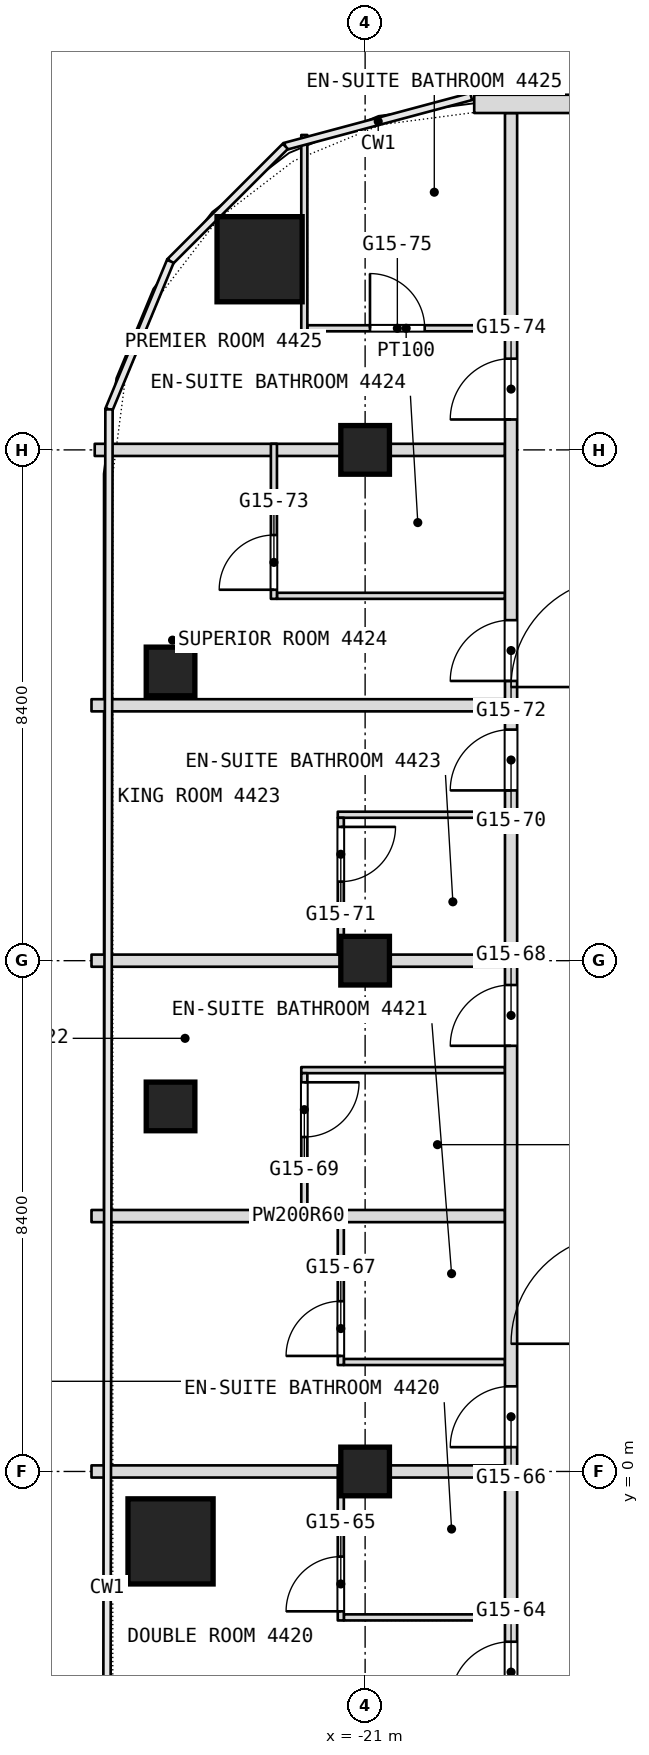
"""IFC4 building model, lengths in metres.
Left out: names, types, materials, properties, quantities, classifications, styles, units other than length and angle.
Written with IfcOpenShell. Run it as: python <this file> out.ifc"""

import sys

from ifc_helpers import new_model, si_unit, direction, frame, frame_2d, origin, origin_2d, place, context, subcontext, project, spatial, rectangle, extrude, element, fill, save


model = new_model("IFC4")
c1 = context("Model", 3, precision=1e-05, world=origin(), true_north=direction((0.0, 1.0)))
c2 = subcontext(c1, "Body", "Model", "MODEL_VIEW")
j1 = project(units=[si_unit("LENGTHUNIT", "METRE"), si_unit("PLANEANGLEUNIT", "RADIAN")], contexts=[c1])
p1 = place(None, origin())
s1 = spatial("IfcSite", under=j1, at=p1, CompositionType="ELEMENT")
p2 = place(p1, origin())
s2 = spatial("IfcBuilding", under=s1, at=p2, CompositionType="ELEMENT")
p3 = place(p2, frame((0.0, 0.0, 194.9)))
s3 = spatial("IfcBuildingStorey", under=s2, at=p3, CompositionType="ELEMENT", Elevation=194.9)
for number, where, z_axis, x_axis in (
    (1, (-22.736, 19.936, 0.0), (0.0, 0.0, 1.0), (1.0, 0.0, 0.0)),
    (2, (-24.2, -1.15, 0.0), (0.0, 0.0, 1.0), (1.0, 0.0, 0.0)),
):
    element("IfcColumn", number, at=place(p3, frame(where, z_axis=z_axis, x_axis=x_axis)), inside=s3, PredefinedType="COLUMN", context=c2, shape_type="SweptSolid", body=[
        extrude(rectangle(XDim=1.4, YDim=1.4, at=origin_2d()), origin(), (0.0, 0.0, 1.0), 3.6),
    ])
for number, where, z_axis, x_axis in (
    (3, (-21.0, 0.0, 0.0), (0.0, 0.0, 1.0), (1.0, 0.0, 0.0)),
    (4, (-21.0, 8.4, 0.0), (0.0, 0.0, 1.0), (1.0, 0.0, 0.0)),
    (5, (-21.0, 16.8, 0.0), (0.0, 0.0, 1.0), (1.0, 0.0, 0.0)),
    (6, (-24.2, 6.003, 0.0), (0.0, 0.0, 1.0), (1.0, 0.0, 0.0)),
    (7, (-24.2, 13.156, 0.0), (0.0, 0.0, 1.0), (1.0, 0.0, 0.0)),
):
    element("IfcColumn", number, at=place(p3, frame(where, z_axis=z_axis, x_axis=x_axis)), inside=s3, PredefinedType="COLUMN", context=c2, shape_type="SweptSolid", body=[
        extrude(rectangle(XDim=0.8, YDim=0.8, at=origin_2d()), origin(), (0.0, 0.0, 1.0), 3.6),
    ])
p4 = place(p3, frame((-21.35, -2.4, 0.0), z_axis=(0.0, 0.0, 1.0), x_axis=(1.0, 0.0, 0.0)))
e8 = element("IfcWall", 8, at=p4, inside=s3, PredefinedType="PARTITIONING", context=c2, shape_type="SweptSolid", body=[
    extrude(rectangle(XDim=2.65, YDim=0.1, at=frame_2d((1.325, 0.0))), origin(), (0.0, 0.0, 1.0), 3.34),
])
p5 = place(p3, frame((-25.5, 0.0, 0.0), z_axis=(0.0, 0.0, 1.0), x_axis=(1.0, 0.0, 0.0)))
e9 = element("IfcWall", 9, at=p5, inside=s3, PredefinedType="PARTITIONING", context=c2, shape_type="SweptSolid", body=[
    extrude(rectangle(XDim=6.8, YDim=0.2, at=frame_2d((3.4, 0.0))), origin(), (0.0, 0.0, 1.0), 2.94),
])
p6 = place(p3, frame((-21.35, 1.8, 0.0), z_axis=(0.0, 0.0, 1.0), x_axis=(1.0, 0.0, 0.0)))
e10 = element("IfcWall", 10, at=p6, inside=s3, PredefinedType="PARTITIONING", context=c2, shape_type="SweptSolid", body=[
    extrude(rectangle(XDim=2.65, YDim=0.1, at=frame_2d((1.325, 0.0))), origin(), (0.0, 0.0, 1.0), 3.34),
])
p7 = place(p3, frame((-25.5, 4.2, 0.0), z_axis=(0.0, 0.0, 1.0), x_axis=(1.0, 0.0, 0.0)))
e11 = element("IfcWall", 11, at=p7, inside=s3, PredefinedType="PARTITIONING", context=c2, shape_type="SweptSolid", body=[
    extrude(rectangle(XDim=6.8, YDim=0.2, at=frame_2d((3.4, 0.0))), origin(), (0.0, 0.0, 1.0), 3.34),
])
p8 = place(p3, frame((-22.05, 6.6, 0.0), z_axis=(0.0, 0.0, 1.0), x_axis=(1.0, 0.0, 0.0)))
e12 = element("IfcWall", 12, at=p8, inside=s3, PredefinedType="PARTITIONING", context=c2, shape_type="SweptSolid", body=[
    extrude(rectangle(XDim=3.35, YDim=0.1, at=frame_2d((1.675, 0.0))), origin(), (0.0, 0.0, 1.0), 3.34),
])
p9 = place(p3, frame((-25.5, 8.4, 0.0), z_axis=(0.0, 0.0, 1.0), x_axis=(1.0, 0.0, 0.0)))
e13 = element("IfcWall", 13, at=p9, inside=s3, PredefinedType="PARTITIONING", context=c2, shape_type="SweptSolid", body=[
    extrude(rectangle(XDim=6.8, YDim=0.2, at=frame_2d((3.4, 0.0))), origin(), (0.0, 0.0, 1.0), 2.94),
])
p10 = place(p3, frame((-21.45, 10.8, 0.0), z_axis=(0.0, 0.0, 1.0), x_axis=(1.0, 0.0, 0.0)))
e14 = element("IfcWall", 14, at=p10, inside=s3, PredefinedType="PARTITIONING", context=c2, shape_type="SweptSolid", body=[
    extrude(rectangle(XDim=2.75, YDim=0.1, at=frame_2d((1.375, 0.0))), origin(), (0.0, 0.0, 1.0), 3.34),
])
p11 = place(p3, frame((-25.5, 12.6, 0.0), z_axis=(0.0, 0.0, 1.0), x_axis=(1.0, 0.0, 0.0)))
e15 = element("IfcWall", 15, at=p11, inside=s3, PredefinedType="PARTITIONING", context=c2, shape_type="SweptSolid", body=[
    extrude(rectangle(XDim=6.8, YDim=0.2, at=frame_2d((3.4, 0.0))), origin(), (0.0, 0.0, 1.0), 3.34),
])
p12 = place(p3, frame((-22.45, 14.4, 0.0), z_axis=(0.0, 0.0, 1.0), x_axis=(1.0, 0.0, 0.0)))
e16 = element("IfcWall", 16, at=p12, inside=s3, PredefinedType="PARTITIONING", context=c2, shape_type="SweptSolid", body=[
    extrude(rectangle(XDim=3.75, YDim=0.1, at=frame_2d((1.875, 0.0))), origin(), (0.0, 0.0, 1.0), 3.34),
])
p13 = place(p3, frame((-25.447, 16.8, 0.0), z_axis=(0.0, 0.0, 1.0), x_axis=(1.0, 0.0, 0.0)))
e17 = element("IfcWall", 17, at=p13, inside=s3, PredefinedType="PARTITIONING", context=c2, shape_type="SweptSolid", body=[
    extrude(rectangle(XDim=6.747, YDim=0.2, at=frame_2d((3.374, 0.0))), origin(), (0.0, 0.0, 1.0), 2.94),
])
p14 = place(p3, frame((-18.6, -26.751, 0.0), z_axis=(0.0, 0.0, 1.0), x_axis=(0.0, 1.0, 0.0)))
e18 = element("IfcWall", 18, at=p14, inside=s3, PredefinedType="PARTITIONING", context=c2, shape_type="SweptSolid", body=[
    extrude(rectangle(XDim=49.091, YDim=0.2, at=frame_2d((24.545, 0.0))), origin(), (0.0, 0.0, 1.0), 3.34),
])
p15 = place(p14, frame((3.413, 0.0, 0.0)))
e19 = element("IfcOpeningElement", 19, at=p15, cuts=e18, PredefinedType="OPENING", context=c2, shape_type="SweptSolid", body=[
    extrude(rectangle(XDim=1.0, YDim=2.1, at=frame_2d((0.5, 1.05))), frame((0.0, 0.1, 0.0), z_axis=(0.0, -1.0, 0.0), x_axis=(1.0, 0.0, 0.0)), (0.0, 0.0, 1.0), 0.2),
])
p16 = place(p14, frame((5.838, 0.0, 0.0)))
e20 = element("IfcOpeningElement", 20, at=p16, cuts=e18, PredefinedType="OPENING", context=c2, shape_type="SweptSolid", body=[
    extrude(rectangle(XDim=1.0, YDim=2.1, at=frame_2d((0.5, 1.05))), frame((0.0, 0.1, 0.0), z_axis=(0.0, -1.0, 0.0), x_axis=(1.0, 0.0, 0.0)), (0.0, 0.0, 1.0), 0.2),
])
p17 = place(p14, frame((10.351, 0.0, 0.0)))
e21 = element("IfcOpeningElement", 21, at=p17, cuts=e18, PredefinedType="OPENING", context=c2, shape_type="SweptSolid", body=[
    extrude(rectangle(XDim=1.0, YDim=2.1, at=frame_2d((0.5, 1.05))), frame((0.0, 0.1, 0.0), z_axis=(0.0, -1.0, 0.0), x_axis=(1.0, 0.0, 0.0)), (0.0, 0.0, 1.0), 0.2),
])
p18 = place(p14, frame((16.951, 0.0, 0.0)))
e22 = element("IfcOpeningElement", 22, at=p18, cuts=e18, PredefinedType="OPENING", context=c2, shape_type="SweptSolid", body=[
    extrude(rectangle(XDim=1.0, YDim=2.1, at=frame_2d((0.5, 1.05))), frame((0.0, 0.1, 0.0), z_axis=(0.0, -1.0, 0.0), x_axis=(1.0, 0.0, 0.0)), (0.0, 0.0, 1.0), 0.2),
])
p19 = place(p14, frame((21.151, 0.0, 0.0)))
e23 = element("IfcOpeningElement", 23, at=p19, cuts=e18, PredefinedType="OPENING", context=c2, shape_type="SweptSolid", body=[
    extrude(rectangle(XDim=1.0, YDim=2.1, at=frame_2d((0.5, 1.05))), frame((0.0, 0.1, 0.0), z_axis=(0.0, -1.0, 0.0), x_axis=(1.0, 0.0, 0.0)), (0.0, 0.0, 1.0), 0.2),
])
p20 = place(p14, frame((22.951, 0.0, 0.0)))
e24 = element("IfcOpeningElement", 24, at=p20, cuts=e18, PredefinedType="OPENING", context=c2, shape_type="SweptSolid", body=[
    extrude(rectangle(XDim=1.0, YDim=2.1, at=frame_2d((0.5, 1.05))), frame((0.0, 0.1, 0.0), z_axis=(0.0, -1.0, 0.0), x_axis=(1.0, 0.0, 0.0)), (0.0, 0.0, 1.0), 0.2),
])
p21 = place(p14, frame((27.151, 0.0, 0.0)))
e25 = element("IfcOpeningElement", 25, at=p21, cuts=e18, PredefinedType="OPENING", context=c2, shape_type="SweptSolid", body=[
    extrude(rectangle(XDim=1.0, YDim=2.1, at=frame_2d((0.5, 1.05))), frame((0.0, 0.1, 0.0), z_axis=(0.0, -1.0, 0.0), x_axis=(1.0, 0.0, 0.0)), (0.0, 0.0, 1.0), 0.2),
])
p22 = place(p14, frame((33.751, 0.0, 0.0)))
e26 = element("IfcOpeningElement", 26, at=p22, cuts=e18, PredefinedType="OPENING", context=c2, shape_type="SweptSolid", body=[
    extrude(rectangle(XDim=1.0, YDim=2.1, at=frame_2d((0.5, 1.05))), frame((0.0, 0.1, 0.0), z_axis=(0.0, -1.0, 0.0), x_axis=(1.0, 0.0, 0.0)), (0.0, 0.0, 1.0), 0.2),
])
p23 = place(p14, frame((37.951, 0.0, 0.0)))
e27 = element("IfcOpeningElement", 27, at=p23, cuts=e18, PredefinedType="OPENING", context=c2, shape_type="SweptSolid", body=[
    extrude(rectangle(XDim=1.0, YDim=2.1, at=frame_2d((0.5, 1.05))), frame((0.0, 0.1, 0.0), z_axis=(0.0, -1.0, 0.0), x_axis=(1.0, 0.0, 0.0)), (0.0, 0.0, 1.0), 0.2),
])
p24 = place(p14, frame((39.751, 0.0, 0.0)))
e28 = element("IfcOpeningElement", 28, at=p24, cuts=e18, PredefinedType="OPENING", context=c2, shape_type="SweptSolid", body=[
    extrude(rectangle(XDim=1.0, YDim=2.1, at=frame_2d((0.5, 1.05))), frame((0.0, 0.1, 0.0), z_axis=(0.0, -1.0, 0.0), x_axis=(1.0, 0.0, 0.0)), (0.0, 0.0, 1.0), 0.2),
])
p25 = place(p14, frame((44.051, 0.0, 0.0)))
e29 = element("IfcOpeningElement", 29, at=p25, cuts=e18, PredefinedType="OPENING", context=c2, shape_type="SweptSolid", body=[
    extrude(rectangle(XDim=1.0, YDim=2.1, at=frame_2d((0.5, 1.05))), frame((0.0, 0.1, 0.0), z_axis=(0.0, -1.0, 0.0), x_axis=(1.0, 0.0, 0.0)), (0.0, 0.0, 1.0), 0.2),
])
p26 = place(p3, frame((-21.95, 18.8, 0.0), z_axis=(0.0, 0.0, 1.0), x_axis=(1.0, 0.0, 0.0)))
e30 = element("IfcWall", 30, at=p26, inside=s3, PredefinedType="PARTITIONING", context=c2, shape_type="SweptSolid", body=[
    extrude(rectangle(XDim=3.25, YDim=0.1, at=frame_2d((1.625, 0.0))), origin(), (0.0, 0.0, 1.0), 3.34),
])
p27 = place(p26, frame((1.03, 0.0, 0.0)))
e31 = element("IfcOpeningElement", 31, at=p27, cuts=e30, PredefinedType="OPENING", context=c2, shape_type="SweptSolid", body=[
    extrude(rectangle(XDim=0.9, YDim=2.1, at=frame_2d((0.45, 1.05))), frame((0.0, 0.05, 0.0), z_axis=(0.0, -1.0, 0.0), x_axis=(1.0, 0.0, 0.0)), (0.0, 0.0, 1.0), 0.1),
])
p28 = place(p3, frame((-21.4, -2.45, 0.0), z_axis=(0.0, 0.0, 1.0), x_axis=(0.0, 1.0, 0.0)))
e32 = element("IfcWall", 32, at=p28, inside=s3, PredefinedType="PARTITIONING", context=c2, shape_type="SweptSolid", body=[
    extrude(rectangle(XDim=2.55, YDim=0.1, at=frame_2d((1.275, 0.0))), origin(), (0.0, 0.0, 1.0), 3.34),
])
p29 = place(p28, frame((0.15, 0.0, 0.0)))
e33 = element("IfcOpeningElement", 33, at=p29, cuts=e32, PredefinedType="OPENING", context=c2, shape_type="SweptSolid", body=[
    extrude(rectangle(XDim=0.9, YDim=2.1, at=frame_2d((0.45, 1.05))), frame((0.0, 0.05, 0.0), z_axis=(0.0, -1.0, 0.0), x_axis=(1.0, 0.0, 0.0)), (0.0, 0.0, 1.0), 0.1),
])
p30 = place(p3, frame((-21.4, 1.75, 0.0), z_axis=(0.0, 0.0, 1.0), x_axis=(0.0, 1.0, 0.0)))
e34 = element("IfcWall", 34, at=p30, inside=s3, PredefinedType="PARTITIONING", context=c2, shape_type="SweptSolid", body=[
    extrude(rectangle(XDim=2.55, YDim=0.1, at=frame_2d((1.275, 0.0))), origin(), (0.0, 0.0, 1.0), 3.34),
])
p31 = place(p30, frame((0.15, 0.0, 0.0)))
e35 = element("IfcOpeningElement", 35, at=p31, cuts=e34, PredefinedType="OPENING", context=c2, shape_type="SweptSolid", body=[
    extrude(rectangle(XDim=0.9, YDim=2.1, at=frame_2d((0.45, 1.05))), frame((0.0, 0.05, 0.0), z_axis=(0.0, -1.0, 0.0), x_axis=(1.0, 0.0, 0.0)), (0.0, 0.0, 1.0), 0.1),
])
p32 = place(p3, frame((-21.4, 8.5, 0.0), z_axis=(0.0, 0.0, 1.0), x_axis=(0.0, 1.0, 0.0)))
e36 = element("IfcWall", 36, at=p32, inside=s3, PredefinedType="PARTITIONING", context=c2, shape_type="SweptSolid", body=[
    extrude(rectangle(XDim=2.25, YDim=0.1, at=frame_2d((1.125, 0.0))), origin(), (0.0, 0.0, 1.0), 3.34),
])
p33 = place(p32, frame((1.2, 0.0, 0.0)))
e37 = element("IfcOpeningElement", 37, at=p33, cuts=e36, PredefinedType="OPENING", context=c2, shape_type="SweptSolid", body=[
    extrude(rectangle(XDim=0.9, YDim=2.1, at=frame_2d((0.45, 1.05))), frame((0.0, 0.05, 0.0), z_axis=(0.0, -1.0, 0.0), x_axis=(1.0, 0.0, 0.0)), (0.0, 0.0, 1.0), 0.1),
])
p34 = place(p3, frame((-22.0, 4.3, 0.0), z_axis=(0.0, 0.0, 1.0), x_axis=(0.0, 1.0, 0.0)))
e38 = element("IfcWall", 38, at=p34, inside=s3, PredefinedType="PARTITIONING", context=c2, shape_type="SweptSolid", body=[
    extrude(rectangle(XDim=2.25, YDim=0.1, at=frame_2d((1.125, 0.0))), origin(), (0.0, 0.0, 1.0), 3.34),
])
p35 = place(p34, frame((1.2, 0.0, 0.0)))
e39 = element("IfcOpeningElement", 39, at=p35, cuts=e38, PredefinedType="OPENING", context=c2, shape_type="SweptSolid", body=[
    extrude(rectangle(XDim=0.9, YDim=2.1, at=frame_2d((0.45, 1.05))), frame((0.0, 0.05, 0.0), z_axis=(0.0, -1.0, 0.0), x_axis=(1.0, 0.0, 0.0)), (0.0, 0.0, 1.0), 0.1),
])
p36 = place(p3, frame((-22.0, 18.75, 0.0), z_axis=(0.0, 0.0, 1.0), x_axis=(0.0, 1.0, 0.0)))
e40 = element("IfcWall", 40, at=p36, inside=s3, PredefinedType="PARTITIONING", context=c2, shape_type="SweptSolid", body=[
    extrude(rectangle(XDim=3.229, YDim=0.1, at=frame_2d((1.615, 0.0))), origin(), (0.0, 0.0, 1.0), 3.34),
])
p37 = place(p3, frame((-22.5, 14.35, 0.0), z_axis=(0.0, 0.0, 1.0), x_axis=(0.0, 1.0, 0.0)))
e41 = element("IfcWall", 41, at=p37, inside=s3, PredefinedType="PARTITIONING", context=c2, shape_type="SweptSolid", body=[
    extrude(rectangle(XDim=2.55, YDim=0.1, at=frame_2d((1.275, 0.0))), origin(), (0.0, 0.0, 1.0), 3.34),
])
p38 = place(p37, frame((0.15, 0.0, 0.0)))
e42 = element("IfcOpeningElement", 42, at=p38, cuts=e41, PredefinedType="OPENING", context=c2, shape_type="SweptSolid", body=[
    extrude(rectangle(XDim=0.9, YDim=2.1, at=frame_2d((0.45, 1.05))), frame((0.0, 0.05, 0.0), z_axis=(0.0, -1.0, 0.0), x_axis=(1.0, 0.0, 0.0)), (0.0, 0.0, 1.0), 0.1),
])
p39 = place(p3, frame((19.206, 22.49, 0.0), z_axis=(0.0, 0.0, 1.0), x_axis=(-1.0, 0.0, 0.0)))
e43 = element("IfcWall", 43, at=p39, inside=s3, PredefinedType="NOTDEFINED", context=c2, shape_type="SweptSolid", body=[
    extrude(rectangle(XDim=38.412, YDim=0.3, at=frame_2d((19.206, 0.0))), origin(), (0.0, 0.0, 1.0), 3.6),
])
p40 = place(p39, frame((3.306, 0.0, 0.9)))
e44 = element("IfcOpeningElement", 44, at=p40, cuts=e43, PredefinedType="OPENING", context=c2, shape_type="SweptSolid", body=[
    extrude(rectangle(XDim=2.4, YDim=2.1, at=frame_2d((1.2, 1.05))), frame((0.0, 0.15, 0.0), z_axis=(0.0, -1.0, 0.0), x_axis=(1.0, 0.0, 0.0)), (0.0, 0.0, 1.0), 0.3),
])
p41 = place(p39, frame((7.506, 0.0, 0.9)))
e45 = element("IfcOpeningElement", 45, at=p41, cuts=e43, PredefinedType="OPENING", context=c2, shape_type="SweptSolid", body=[
    extrude(rectangle(XDim=2.4, YDim=2.1, at=frame_2d((1.2, 1.05))), frame((0.0, 0.15, 0.0), z_axis=(0.0, -1.0, 0.0), x_axis=(1.0, 0.0, 0.0)), (0.0, 0.0, 1.0), 0.3),
])
p42 = place(p39, frame((11.706, 0.0, 0.9)))
e46 = element("IfcOpeningElement", 46, at=p42, cuts=e43, PredefinedType="OPENING", context=c2, shape_type="SweptSolid", body=[
    extrude(rectangle(XDim=2.4, YDim=2.1, at=frame_2d((1.2, 1.05))), frame((0.0, 0.15, 0.0), z_axis=(0.0, -1.0, 0.0), x_axis=(1.0, 0.0, 0.0)), (0.0, 0.0, 1.0), 0.3),
])
p43 = place(p39, frame((15.906, 0.0, 0.9)))
e47 = element("IfcOpeningElement", 47, at=p43, cuts=e43, PredefinedType="OPENING", context=c2, shape_type="SweptSolid", body=[
    extrude(rectangle(XDim=2.4, YDim=2.1, at=frame_2d((1.2, 1.05))), frame((0.0, 0.15, 0.0), z_axis=(0.0, -1.0, 0.0), x_axis=(1.0, 0.0, 0.0)), (0.0, 0.0, 1.0), 0.3),
])
p44 = place(p39, frame((20.106, 0.0, 0.9)))
e48 = element("IfcOpeningElement", 48, at=p44, cuts=e43, PredefinedType="OPENING", context=c2, shape_type="SweptSolid", body=[
    extrude(rectangle(XDim=2.4, YDim=2.1, at=frame_2d((1.2, 1.05))), frame((0.0, 0.15, 0.0), z_axis=(0.0, -1.0, 0.0), x_axis=(1.0, 0.0, 0.0)), (0.0, 0.0, 1.0), 0.3),
])
p45 = place(p39, frame((24.306, 0.0, 0.9)))
e49 = element("IfcOpeningElement", 49, at=p45, cuts=e43, PredefinedType="OPENING", context=c2, shape_type="SweptSolid", body=[
    extrude(rectangle(XDim=2.4, YDim=2.1, at=frame_2d((1.2, 1.05))), frame((0.0, 0.15, 0.0), z_axis=(0.0, -1.0, 0.0), x_axis=(1.0, 0.0, 0.0)), (0.0, 0.0, 1.0), 0.3),
])
p46 = place(p39, frame((28.506, 0.0, 0.9)))
e50 = element("IfcOpeningElement", 50, at=p46, cuts=e43, PredefinedType="OPENING", context=c2, shape_type="SweptSolid", body=[
    extrude(rectangle(XDim=2.4, YDim=2.1, at=frame_2d((1.2, 1.05))), frame((0.0, 0.15, 0.0), z_axis=(0.0, -1.0, 0.0), x_axis=(1.0, 0.0, 0.0)), (0.0, 0.0, 1.0), 0.3),
])
p47 = place(p39, frame((32.706, 0.0, 0.9)))
e51 = element("IfcOpeningElement", 51, at=p47, cuts=e43, PredefinedType="OPENING", context=c2, shape_type="SweptSolid", body=[
    extrude(rectangle(XDim=2.4, YDim=2.1, at=frame_2d((1.2, 1.05))), frame((0.0, 0.15, 0.0), z_axis=(0.0, -1.0, 0.0), x_axis=(1.0, 0.0, 0.0)), (0.0, 0.0, 1.0), 0.3),
])
p48 = place(p20, origin())
e52 = element("IfcDoor", 52, at=p48, inside=s3, OperationType="SINGLE_SWING_LEFT", PredefinedType="DOOR", context=c2, shape_type="SweptSolid", body=[
    extrude(rectangle(XDim=1.0, YDim=2.1, at=frame_2d((0.5, 1.05))), frame((0.0, 0.025, 0.0), z_axis=(0.0, -1.0, 0.0), x_axis=(1.0, 0.0, 0.0)), (0.0, 0.0, 1.0), 0.05),
])
fill(e24, e52)
p49 = place(p21, origin())
e53 = element("IfcDoor", 53, at=p49, inside=s3, OperationType="SINGLE_SWING_LEFT", PredefinedType="DOOR", context=c2, shape_type="SweptSolid", body=[
    extrude(rectangle(XDim=1.0, YDim=2.1, at=frame_2d((0.5, 1.05))), frame((0.0, 0.025, 0.0), z_axis=(0.0, -1.0, 0.0), x_axis=(1.0, 0.0, 0.0)), (0.0, 0.0, 1.0), 0.05),
])
fill(e25, e53)
p50 = place(p22, origin())
e54 = element("IfcDoor", 54, at=p50, inside=s3, OperationType="SINGLE_SWING_LEFT", PredefinedType="DOOR", context=c2, shape_type="SweptSolid", body=[
    extrude(rectangle(XDim=1.0, YDim=2.1, at=frame_2d((0.5, 1.05))), frame((0.0, 0.025, 0.0), z_axis=(0.0, -1.0, 0.0), x_axis=(1.0, 0.0, 0.0)), (0.0, 0.0, 1.0), 0.05),
])
fill(e26, e54)
p51 = place(p23, origin())
e55 = element("IfcDoor", 55, at=p51, inside=s3, OperationType="SINGLE_SWING_LEFT", PredefinedType="DOOR", context=c2, shape_type="SweptSolid", body=[
    extrude(rectangle(XDim=1.0, YDim=2.1, at=frame_2d((0.5, 1.05))), frame((0.0, 0.025, 0.0), z_axis=(0.0, -1.0, 0.0), x_axis=(1.0, 0.0, 0.0)), (0.0, 0.0, 1.0), 0.05),
])
fill(e27, e55)
p52 = place(p24, origin())
e56 = element("IfcDoor", 56, at=p52, inside=s3, OperationType="SINGLE_SWING_LEFT", PredefinedType="DOOR", context=c2, shape_type="SweptSolid", body=[
    extrude(rectangle(XDim=1.0, YDim=2.1, at=frame_2d((0.5, 1.05))), frame((0.0, 0.025, 0.0), z_axis=(0.0, -1.0, 0.0), x_axis=(1.0, 0.0, 0.0)), (0.0, 0.0, 1.0), 0.05),
])
fill(e28, e56)
p53 = place(p25, origin())
e57 = element("IfcDoor", 57, at=p53, inside=s3, OperationType="SINGLE_SWING_LEFT", PredefinedType="DOOR", context=c2, shape_type="SweptSolid", body=[
    extrude(rectangle(XDim=1.0, YDim=2.1, at=frame_2d((0.5, 1.05))), frame((0.0, 0.025, 0.0), z_axis=(0.0, -1.0, 0.0), x_axis=(1.0, 0.0, 0.0)), (0.0, 0.0, 1.0), 0.05),
])
fill(e29, e57)
p54 = place(p27, origin())
e58 = element("IfcDoor", 58, at=p54, inside=s3, OperationType="SINGLE_SWING_LEFT", PredefinedType="DOOR", context=c2, shape_type="SweptSolid", body=[
    extrude(rectangle(XDim=0.9, YDim=2.1, at=frame_2d((0.45, 1.05))), frame((0.0, 0.025, 0.0), z_axis=(0.0, -1.0, 0.0), x_axis=(1.0, 0.0, 0.0)), (0.0, 0.0, 1.0), 0.05),
])
fill(e31, e58)
p55 = place(p29, origin())
e59 = element("IfcDoor", 59, at=p55, inside=s3, OperationType="SINGLE_SWING_RIGHT", PredefinedType="DOOR", context=c2, shape_type="SweptSolid", body=[
    extrude(rectangle(XDim=0.9, YDim=2.1, at=frame_2d((0.45, 1.05))), frame((0.0, 0.025, 0.0), z_axis=(0.0, -1.0, 0.0), x_axis=(1.0, 0.0, 0.0)), (0.0, 0.0, 1.0), 0.05),
])
fill(e33, e59)
p56 = place(p31, origin())
e60 = element("IfcDoor", 60, at=p56, inside=s3, OperationType="SINGLE_SWING_RIGHT", PredefinedType="DOOR", context=c2, shape_type="SweptSolid", body=[
    extrude(rectangle(XDim=0.9, YDim=2.1, at=frame_2d((0.45, 1.05))), frame((0.0, 0.025, 0.0), z_axis=(0.0, -1.0, 0.0), x_axis=(1.0, 0.0, 0.0)), (0.0, 0.0, 1.0), 0.05),
])
fill(e35, e60)
p57 = place(p33, origin())
e61 = element("IfcDoor", 61, at=p57, inside=s3, OperationType="SINGLE_SWING_LEFT", PredefinedType="DOOR", context=c2, shape_type="SweptSolid", body=[
    extrude(rectangle(XDim=0.9, YDim=2.1, at=frame_2d((0.45, 1.05))), frame((0.0, 0.025, 0.0), z_axis=(0.0, -1.0, 0.0), x_axis=(1.0, 0.0, 0.0)), (0.0, 0.0, 1.0), 0.05),
])
fill(e37, e61)
p58 = place(p35, origin())
e62 = element("IfcDoor", 62, at=p58, inside=s3, OperationType="SINGLE_SWING_LEFT", PredefinedType="DOOR", context=c2, shape_type="SweptSolid", body=[
    extrude(rectangle(XDim=0.9, YDim=2.1, at=frame_2d((0.45, 1.05))), frame((0.0, 0.025, 0.0), z_axis=(0.0, -1.0, 0.0), x_axis=(1.0, 0.0, 0.0)), (0.0, 0.0, 1.0), 0.05),
])
fill(e39, e62)
p59 = place(p38, origin())
e63 = element("IfcDoor", 63, at=p59, inside=s3, OperationType="SINGLE_SWING_RIGHT", PredefinedType="DOOR", context=c2, shape_type="SweptSolid", body=[
    extrude(rectangle(XDim=0.9, YDim=2.1, at=frame_2d((0.45, 1.05))), frame((0.0, 0.025, 0.0), z_axis=(0.0, -1.0, 0.0), x_axis=(1.0, 0.0, 0.0)), (0.0, 0.0, 1.0), 0.05),
])
fill(e42, e63)
save(model, sys.argv[1])
